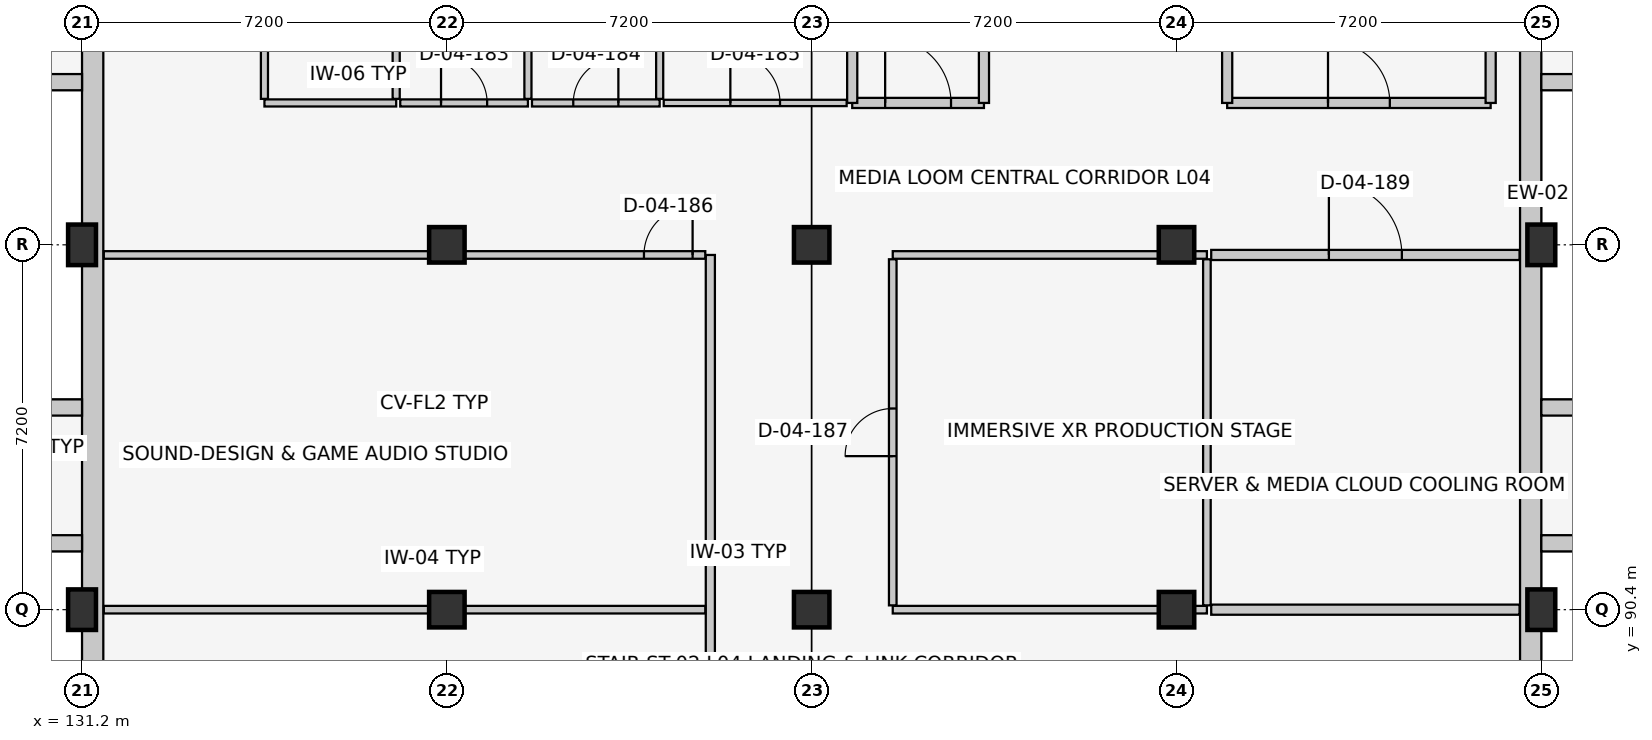
"""IFC4 building model, lengths in metres.
Left out: names, types, materials, properties, quantities, classifications, styles, units other than length and angle.
Written with IfcOpenShell. Run it as: python <this file> out.ifc"""

import sys

from ifc_helpers import new_model, si_unit, direction, frame, frame_2d, origin, origin_2d, place, context, subcontext, project, spatial, rectangle, extrude, element, fill, save


model = new_model("IFC4")
c1 = context("Model", 3, precision=1e-05, world=origin(), true_north=direction((0.0, 1.0)))
c2 = subcontext(c1, "Body", "Model", "MODEL_VIEW")
j1 = project(units=[si_unit("LENGTHUNIT", "METRE"), si_unit("PLANEANGLEUNIT", "RADIAN")], contexts=[c1])
p1 = place(None, origin())
s1 = spatial("IfcSite", under=j1, at=p1, CompositionType="ELEMENT")
p2 = place(p1, origin())
s2 = spatial("IfcBuilding", under=s1, at=p2, CompositionType="ELEMENT")
p3 = place(p2, frame((0.0, 0.0, 18.0)))
s3 = spatial("IfcBuildingStorey", under=s2, at=p3, CompositionType="ELEMENT", Elevation=18.0)
for number, where, z_axis, x_axis in (
    (1, (131.2, 90.4, 0.0), (0.0, 0.0, 1.0), (1.0, 0.0, 0.0)),
    (2, (131.2, 97.6, 0.0), (0.0, 0.0, 1.0), (1.0, 0.0, 0.0)),
):
    element("IfcColumn", number, at=place(p3, frame(where, z_axis=z_axis, x_axis=x_axis)), inside=s3, PredefinedType="COLUMN", context=c2, shape_type="SweptSolid", body=[
        extrude(rectangle(XDim=0.55, YDim=0.8, at=origin_2d()), origin(), (0.0, 0.0, 1.0), 3.9),
    ])
for number, where, z_axis, x_axis in (
    (3, (138.4, 90.4, 0.0), (0.0, 0.0, 1.0), (1.0, 0.0, 0.0)),
    (4, (138.4, 97.6, 0.0), (0.0, 0.0, 1.0), (1.0, 0.0, 0.0)),
    (5, (145.6, 90.4, 0.0), (0.0, 0.0, 1.0), (1.0, 0.0, 0.0)),
    (6, (145.6, 97.6, 0.0), (0.0, 0.0, 1.0), (1.0, 0.0, 0.0)),
    (7, (152.8, 90.4, 0.0), (0.0, 0.0, 1.0), (1.0, 0.0, 0.0)),
    (8, (152.8, 97.6, 0.0), (0.0, 0.0, 1.0), (1.0, 0.0, 0.0)),
):
    element("IfcColumn", number, at=place(p3, frame(where, z_axis=z_axis, x_axis=x_axis)), inside=s3, PredefinedType="COLUMN", context=c2, shape_type="SweptSolid", body=[
        extrude(rectangle(XDim=0.7, YDim=0.7, at=origin_2d()), origin(), (0.0, 0.0, 1.0), 3.9),
    ])
for number, where, z_axis, x_axis in (
    (9, (160.0, 90.4, 0.0), (0.0, 0.0, 1.0), (1.0, 0.0, 0.0)),
    (10, (160.0, 97.6, 0.0), (0.0, 0.0, 1.0), (1.0, 0.0, 0.0)),
):
    element("IfcColumn", number, at=place(p3, frame(where, z_axis=z_axis, x_axis=x_axis)), inside=s3, PredefinedType="COLUMN", context=c2, shape_type="SweptSolid", body=[
        extrude(rectangle(XDim=0.55, YDim=0.8, at=origin_2d()), origin(), (0.0, 0.0, 1.0), 3.9),
    ])
p4 = place(p3, frame((159.79, 112.0, 0.0), z_axis=(0.0, 0.0, 1.0), x_axis=(0.0, -1.0, 0.0)))
e11 = element("IfcWall", 11, at=p4, inside=s3, PredefinedType="SOLIDWALL", context=c2, shape_type="SweptSolid", body=[
    extrude(rectangle(XDim=28.8, YDim=0.42, at=frame_2d((14.4, 0.0))), origin(), (0.0, 0.0, 1.0), 3.055),
])
p5 = place(p3, frame((160.0, 91.71, 0.0), z_axis=(0.0, 0.0, 1.0), x_axis=(1.0, 0.0, 0.0)))
e12 = element("IfcWall", 12, at=p5, inside=s3, PredefinedType="SOLIDWALL", context=c2, shape_type="SweptSolid", body=[
    extrude(rectangle(XDim=1.35, YDim=0.32, at=frame_2d((0.675, 0.0))), origin(), (0.0, 0.0, 1.0), 3.64),
])
for number, where, z_axis, x_axis in (
    (13, (160.0, 94.39, 0.0), (0.0, 0.0, 1.0), (1.0, 0.0, 0.0)),
    (14, (160.0, 100.81, 0.0), (0.0, 0.0, 1.0), (1.0, 0.0, 0.0)),
):
    element("IfcWall", number, at=place(p3, frame(where, z_axis=z_axis, x_axis=x_axis)), inside=s3, PredefinedType="SOLIDWALL", context=c2, shape_type="SweptSolid", body=[
        extrude(rectangle(XDim=1.793, YDim=0.32, at=frame_2d((0.896, 0.0))), origin(), (0.0, 0.0, 1.0), 3.64),
    ])
p6 = place(p3, frame((131.41, 83.2, 0.0), z_axis=(0.0, 0.0, 1.0), x_axis=(0.0, 1.0, 0.0)))
e15 = element("IfcWall", 15, at=p6, inside=s3, PredefinedType="SOLIDWALL", context=c2, shape_type="SweptSolid", body=[
    extrude(rectangle(XDim=28.8, YDim=0.42, at=frame_2d((14.4, 0.0))), origin(), (0.0, 0.0, 1.0), 3.055),
])
p7 = place(p3, frame((131.2, 91.71, 0.0), z_axis=(0.0, 0.0, 1.0), x_axis=(-1.0, 0.0, 0.0)))
e16 = element("IfcWall", 16, at=p7, inside=s3, PredefinedType="SOLIDWALL", context=c2, shape_type="SweptSolid", body=[
    extrude(rectangle(XDim=1.793, YDim=0.32, at=frame_2d((0.896, 0.0))), origin(), (0.0, 0.0, 1.0), 3.64),
])
for number, where, z_axis, x_axis in (
    (17, (131.2, 94.39, 0.0), (0.0, 0.0, 1.0), (-1.0, 0.0, 0.0)),
    (18, (131.2, 100.81, 0.0), (0.0, 0.0, 1.0), (-1.0, 0.0, 0.0)),
):
    element("IfcWall", number, at=place(p3, frame(where, z_axis=z_axis, x_axis=x_axis)), inside=s3, PredefinedType="SOLIDWALL", context=c2, shape_type="SweptSolid", body=[
        extrude(rectangle(XDim=1.35, YDim=0.32, at=frame_2d((0.675, 0.0))), origin(), (0.0, 0.0, 1.0), 3.64),
    ])
p8 = place(p3, frame((146.4, 100.4, 0.0), z_axis=(0.0, 0.0, 1.0), x_axis=(1.0, 0.0, 0.0)))
e19 = element("IfcWall", 19, at=p8, inside=s3, PredefinedType="PARTITIONING", context=c2, shape_type="SweptSolid", body=[
    extrude(rectangle(XDim=2.6, YDim=0.2, at=frame_2d((1.3, 0.0))), origin(), (0.0, 0.0, 1.0), 3.66),
])
p9 = place(p8, frame((0.65, 0.0, 0.0)))
e20 = element("IfcOpeningElement", 20, at=p9, cuts=e19, PredefinedType="OPENING", context=c2, shape_type="SweptSolid", body=[
    extrude(rectangle(XDim=1.3, YDim=2.2, at=frame_2d((0.65, 1.1))), frame((0.0, 0.112, 0.0), z_axis=(0.0, -1.0, 0.0), x_axis=(1.0, 0.0, 0.0)), (0.0, 0.0, 1.0), 0.224),
])
p10 = place(p3, frame((146.4, 106.2, 0.0), z_axis=(0.0, 0.0, 1.0), x_axis=(0.0, -1.0, 0.0)))
e21 = element("IfcWall", 21, at=p10, inside=s3, PredefinedType="PARTITIONING", context=c2, shape_type="SweptSolid", body=[
    extrude(rectangle(XDim=5.8, YDim=0.2, at=frame_2d((2.9, 0.0))), origin(), (0.0, 0.0, 1.0), 3.66),
])
p11 = place(p3, frame((149.0, 100.4, 0.0), z_axis=(0.0, 0.0, 1.0), x_axis=(0.0, 1.0, 0.0)))
e22 = element("IfcWall", 22, at=p11, inside=s3, PredefinedType="PARTITIONING", context=c2, shape_type="SweptSolid", body=[
    extrude(rectangle(XDim=5.8, YDim=0.2, at=frame_2d((2.9, 0.0))), origin(), (0.0, 0.0, 1.0), 3.325),
])
p12 = place(p3, frame((153.8, 100.4, 0.0), z_axis=(0.0, 0.0, 1.0), x_axis=(1.0, 0.0, 0.0)))
e23 = element("IfcWall", 23, at=p12, inside=s3, PredefinedType="PARTITIONING", context=c2, shape_type="SweptSolid", body=[
    extrude(rectangle(XDim=5.2, YDim=0.2, at=frame_2d((2.6, 0.0))), origin(), (0.0, 0.0, 1.0), 3.66),
])
p13 = place(p12, frame((1.99, 0.0, 0.0)))
e24 = element("IfcOpeningElement", 24, at=p13, cuts=e23, PredefinedType="OPENING", context=c2, shape_type="SweptSolid", body=[
    extrude(rectangle(XDim=1.22, YDim=2.2, at=frame_2d((0.61, 1.1))), frame((0.0, 0.112, 0.0), z_axis=(0.0, -1.0, 0.0), x_axis=(1.0, 0.0, 0.0)), (0.0, 0.0, 1.0), 0.224),
])
for number, where, z_axis, x_axis in (
    (25, (153.8, 106.2, 0.0), (0.0, 0.0, 1.0), (0.0, -1.0, 0.0)),
    (26, (159.0, 100.4, 0.0), (0.0, 0.0, 1.0), (0.0, 1.0, 0.0)),
):
    element("IfcWall", number, at=place(p3, frame(where, z_axis=z_axis, x_axis=x_axis)), inside=s3, PredefinedType="PARTITIONING", context=c2, shape_type="SweptSolid", body=[
        extrude(rectangle(XDim=5.8, YDim=0.2, at=frame_2d((2.9, 0.0))), origin(), (0.0, 0.0, 1.0), 3.66),
    ])
p14 = place(p3, frame((143.6, 83.63, 0.0), z_axis=(0.0, 0.0, 1.0), x_axis=(0.0, 1.0, 0.0)))
e27 = element("IfcWall", 27, at=p14, inside=s3, PredefinedType="PARTITIONING", context=c2, shape_type="SweptSolid", body=[
    extrude(rectangle(XDim=13.77, YDim=0.18, at=frame_2d((6.885, 0.0))), origin(), (0.0, 0.0, 1.0), 3.66),
])
p15 = place(p14, frame((2.925, 0.0, 0.0)))
e28 = element("IfcOpeningElement", 28, at=p15, cuts=e27, PredefinedType="OPENING", context=c2, shape_type="SweptSolid", body=[
    extrude(rectangle(XDim=0.92, YDim=2.08, at=frame_2d((0.46, 1.04))), frame((0.0, 0.102, 0.0), z_axis=(0.0, -1.0, 0.0), x_axis=(1.0, 0.0, 0.0)), (0.0, 0.0, 1.0), 0.204),
])
p16 = place(p3, frame((134.8, 100.4, 0.0), z_axis=(0.0, 0.0, 1.0), x_axis=(1.0, 0.0, 0.0)))
e29 = element("IfcWall", 29, at=p16, inside=s3, PredefinedType="PARTITIONING", context=c2, shape_type="SweptSolid", body=[
    extrude(rectangle(XDim=2.6, YDim=0.14, at=frame_2d((1.3, 0.0))), origin(), (0.0, 0.0, 1.0), 3.66),
])
p17 = place(p3, frame((134.8, 100.48, 0.0), z_axis=(0.0, 0.0, 1.0), x_axis=(0.0, 1.0, 0.0)))
e30 = element("IfcWall", 30, at=p17, inside=s3, PredefinedType="PARTITIONING", context=c2, shape_type="SweptSolid", body=[
    extrude(rectangle(XDim=4.86, YDim=0.14, at=frame_2d((2.43, 0.0))), origin(), (0.0, 0.0, 1.0), 3.445),
])
p18 = place(p17, frame((1.93, 0.0, 0.0)))
e31 = element("IfcOpeningElement", 31, at=p18, cuts=e30, PredefinedType="OPENING", context=c2, shape_type="SweptSolid", body=[
    extrude(rectangle(XDim=1.0, YDim=2.1, at=frame_2d((0.5, 1.05))), frame((0.0, 0.082, 0.0), z_axis=(0.0, -1.0, 0.0), x_axis=(1.0, 0.0, 0.0)), (0.0, 0.0, 1.0), 0.164),
])
p19 = place(p3, frame((137.4, 100.48, 0.0), z_axis=(0.0, 0.0, 1.0), x_axis=(0.0, 1.0, 0.0)))
e32 = element("IfcWall", 32, at=p19, inside=s3, PredefinedType="PARTITIONING", context=c2, shape_type="SweptSolid", body=[
    extrude(rectangle(XDim=4.86, YDim=0.14, at=frame_2d((2.43, 0.0))), origin(), (0.0, 0.0, 1.0), 3.66),
])
p20 = place(p3, frame((137.48, 100.4, 0.0), z_axis=(0.0, 0.0, 1.0), x_axis=(1.0, 0.0, 0.0)))
e33 = element("IfcWall", 33, at=p20, inside=s3, PredefinedType="PARTITIONING", context=c2, shape_type="SweptSolid", body=[
    extrude(rectangle(XDim=2.52, YDim=0.14, at=frame_2d((1.26, 0.0))), origin(), (0.0, 0.0, 1.0), 3.66),
])
p21 = place(p20, frame((0.805, 0.0, 0.0)))
e34 = element("IfcOpeningElement", 34, at=p21, cuts=e33, PredefinedType="OPENING", context=c2, shape_type="SweptSolid", body=[
    extrude(rectangle(XDim=0.91, YDim=2.06, at=frame_2d((0.455, 1.03))), frame((0.0, 0.082, 0.0), z_axis=(0.0, -1.0, 0.0), x_axis=(1.0, 0.0, 0.0)), (0.0, 0.0, 1.0), 0.164),
])
p22 = place(p3, frame((140.0, 100.48, 0.0), z_axis=(0.0, 0.0, 1.0), x_axis=(0.0, 1.0, 0.0)))
e35 = element("IfcWall", 35, at=p22, inside=s3, PredefinedType="PARTITIONING", context=c2, shape_type="SweptSolid", body=[
    extrude(rectangle(XDim=4.86, YDim=0.14, at=frame_2d((2.43, 0.0))), origin(), (0.0, 0.0, 1.0), 3.66),
])
p23 = place(p3, frame((140.08, 100.4, 0.0), z_axis=(0.0, 0.0, 1.0), x_axis=(1.0, 0.0, 0.0)))
e36 = element("IfcWall", 36, at=p23, inside=s3, PredefinedType="PARTITIONING", context=c2, shape_type="SweptSolid", body=[
    extrude(rectangle(XDim=2.52, YDim=0.14, at=frame_2d((1.26, 0.0))), origin(), (0.0, 0.0, 1.0), 3.66),
])
p24 = place(p23, frame((0.815, 0.0, 0.0)))
e37 = element("IfcOpeningElement", 37, at=p24, cuts=e36, PredefinedType="OPENING", context=c2, shape_type="SweptSolid", body=[
    extrude(rectangle(XDim=0.89, YDim=2.05, at=frame_2d((0.445, 1.025))), frame((0.0, 0.082, 0.0), z_axis=(0.0, -1.0, 0.0), x_axis=(1.0, 0.0, 0.0)), (0.0, 0.0, 1.0), 0.164),
])
p25 = place(p3, frame((142.6, 100.48, 0.0), z_axis=(0.0, 0.0, 1.0), x_axis=(0.0, 1.0, 0.0)))
e38 = element("IfcWall", 38, at=p25, inside=s3, PredefinedType="PARTITIONING", context=c2, shape_type="SweptSolid", body=[
    extrude(rectangle(XDim=4.86, YDim=0.14, at=frame_2d((2.43, 0.0))), origin(), (0.0, 0.0, 1.0), 3.66),
])
p26 = place(p3, frame((142.68, 100.4, 0.0), z_axis=(0.0, 0.0, 1.0), x_axis=(1.0, 0.0, 0.0)))
e39 = element("IfcWall", 39, at=p26, inside=s3, PredefinedType="PARTITIONING", context=c2, shape_type="SweptSolid", body=[
    extrude(rectangle(XDim=3.61, YDim=0.125, at=frame_2d((1.805, 0.0))), origin(), (0.0, 0.0, 1.0), 3.66),
])
p27 = place(p26, frame((1.315, 0.0, 0.0)))
e40 = element("IfcOpeningElement", 40, at=p27, cuts=e39, PredefinedType="OPENING", context=c2, shape_type="SweptSolid", body=[
    extrude(rectangle(XDim=0.98, YDim=2.12, at=frame_2d((0.49, 1.06))), frame((0.0, 0.074, 0.0), z_axis=(0.0, -1.0, 0.0), x_axis=(1.0, 0.0, 0.0)), (0.0, 0.0, 1.0), 0.149),
])
p28 = place(p3, frame((131.63, 90.4, 0.0), z_axis=(0.0, 0.0, 1.0), x_axis=(1.0, 0.0, 0.0)))
e41 = element("IfcWall", 41, at=p28, inside=s3, PredefinedType="PARTITIONING", context=c2, shape_type="SweptSolid", body=[
    extrude(rectangle(XDim=11.87, YDim=0.15, at=frame_2d((5.935, 0.0))), origin(), (0.0, 0.0, 1.0), 2.835),
])
p29 = place(p3, frame((131.63, 97.4, 0.0), z_axis=(0.0, 0.0, 1.0), x_axis=(1.0, 0.0, 0.0)))
e42 = element("IfcWall", 42, at=p29, inside=s3, PredefinedType="PARTITIONING", context=c2, shape_type="SweptSolid", body=[
    extrude(rectangle(XDim=11.87, YDim=0.15, at=frame_2d((5.935, 0.0))), origin(), (0.0, 0.0, 1.0), 2.835),
])
p30 = place(p29, frame((10.66, 0.0, 0.0)))
e43 = element("IfcOpeningElement", 43, at=p30, cuts=e42, PredefinedType="OPENING", context=c2, shape_type="SweptSolid", body=[
    extrude(rectangle(XDim=0.96, YDim=2.1, at=frame_2d((0.48, 1.05))), frame((0.0, 0.087, 0.0), z_axis=(0.0, -1.0, 0.0), x_axis=(1.0, 0.0, 0.0)), (0.0, 0.0, 1.0), 0.174),
])
for number, where, z_axis, x_axis in (
    (44, (147.2, 90.4, 0.0), (0.0, 0.0, 1.0), (1.0, 0.0, 0.0)),
    (45, (147.2, 97.4, 0.0), (0.0, 0.0, 1.0), (1.0, 0.0, 0.0)),
):
    element("IfcWall", number, at=place(p3, frame(where, z_axis=z_axis, x_axis=x_axis)), inside=s3, PredefinedType="PARTITIONING", context=c2, shape_type="SweptSolid", body=[
        extrude(rectangle(XDim=6.2, YDim=0.15, at=frame_2d((3.1, 0.0))), origin(), (0.0, 0.0, 1.0), 2.985),
    ])
p31 = place(p3, frame((147.2, 90.485, 0.0), z_axis=(0.0, 0.0, 1.0), x_axis=(0.0, 1.0, 0.0)))
e46 = element("IfcWall", 46, at=p31, inside=s3, PredefinedType="PARTITIONING", context=c2, shape_type="SweptSolid", body=[
    extrude(rectangle(XDim=6.83, YDim=0.15, at=frame_2d((3.415, 0.0))), origin(), (0.0, 0.0, 1.0), 3.66),
])
p32 = place(p31, frame((2.945, 0.0, 0.0)))
e47 = element("IfcOpeningElement", 47, at=p32, cuts=e46, PredefinedType="OPENING", context=c2, shape_type="SweptSolid", body=[
    extrude(rectangle(XDim=0.94, YDim=2.1, at=frame_2d((0.47, 1.05))), frame((0.0, 0.087, 0.0), z_axis=(0.0, -1.0, 0.0), x_axis=(1.0, 0.0, 0.0)), (0.0, 0.0, 1.0), 0.174),
])
p33 = place(p3, frame((153.4, 90.485, 0.0), z_axis=(0.0, 0.0, 1.0), x_axis=(0.0, 1.0, 0.0)))
e48 = element("IfcWall", 48, at=p33, inside=s3, PredefinedType="PARTITIONING", context=c2, shape_type="SweptSolid", body=[
    extrude(rectangle(XDim=6.83, YDim=0.15, at=frame_2d((3.415, 0.0))), origin(), (0.0, 0.0, 1.0), 3.66),
])
p34 = place(p3, frame((153.485, 90.4, 0.0), z_axis=(0.0, 0.0, 1.0), x_axis=(1.0, 0.0, 0.0)))
e49 = element("IfcWall", 49, at=p34, inside=s3, PredefinedType="PARTITIONING", context=c2, shape_type="SweptSolid", body=[
    extrude(rectangle(XDim=6.085, YDim=0.2, at=frame_2d((3.042, 0.0))), origin(), (0.0, 0.0, 1.0), 2.985),
])
p35 = place(p3, frame((153.485, 97.4, 0.0), z_axis=(0.0, 0.0, 1.0), x_axis=(1.0, 0.0, 0.0)))
e50 = element("IfcWall", 50, at=p35, inside=s3, PredefinedType="PARTITIONING", context=c2, shape_type="SweptSolid", body=[
    extrude(rectangle(XDim=6.085, YDim=0.2, at=frame_2d((3.042, 0.0))), origin(), (0.0, 0.0, 1.0), 2.985),
])
p36 = place(p35, frame((2.323, 0.0, 0.0)))
e51 = element("IfcOpeningElement", 51, at=p36, cuts=e50, PredefinedType="OPENING", context=c2, shape_type="SweptSolid", body=[
    extrude(rectangle(XDim=1.44, YDim=2.2, at=frame_2d((0.72, 1.1))), frame((0.0, 0.112, 0.0), z_axis=(0.0, -1.0, 0.0), x_axis=(1.0, 0.0, 0.0)), (0.0, 0.0, 1.0), 0.224),
])
p37 = place(p9, origin())
e52 = element("IfcDoor", 52, at=p37, inside=s3, OperationType="SINGLE_SWING_LEFT", PredefinedType="DOOR", context=c2, shape_type="SweptSolid", body=[
    extrude(rectangle(XDim=1.3, YDim=2.2, at=frame_2d((0.65, 1.1))), frame((0.0, 0.025, 0.0), z_axis=(0.0, -1.0, 0.0), x_axis=(1.0, 0.0, 0.0)), (0.0, 0.0, 1.0), 0.05),
])
fill(e20, e52)
p38 = place(p13, origin())
e53 = element("IfcDoor", 53, at=p38, inside=s3, OperationType="SINGLE_SWING_LEFT", PredefinedType="DOOR", context=c2, shape_type="SweptSolid", body=[
    extrude(rectangle(XDim=1.22, YDim=2.2, at=frame_2d((0.61, 1.1))), frame((0.0, 0.025, 0.0), z_axis=(0.0, -1.0, 0.0), x_axis=(1.0, 0.0, 0.0)), (0.0, 0.0, 1.0), 0.05),
])
fill(e24, e53)
p39 = place(p21, origin())
e54 = element("IfcDoor", 54, at=p39, inside=s3, OperationType="SINGLE_SWING_LEFT", PredefinedType="DOOR", context=c2, shape_type="SweptSolid", body=[
    extrude(rectangle(XDim=0.91, YDim=2.06, at=frame_2d((0.455, 1.03))), frame((0.0, 0.025, 0.0), z_axis=(0.0, -1.0, 0.0), x_axis=(1.0, 0.0, 0.0)), (0.0, 0.0, 1.0), 0.05),
])
fill(e34, e54)
p40 = place(p24, origin())
e55 = element("IfcDoor", 55, at=p40, inside=s3, OperationType="SINGLE_SWING_RIGHT", PredefinedType="DOOR", context=c2, shape_type="SweptSolid", body=[
    extrude(rectangle(XDim=0.89, YDim=2.05, at=frame_2d((0.445, 1.025))), frame((0.0, 0.025, 0.0), z_axis=(0.0, -1.0, 0.0), x_axis=(1.0, 0.0, 0.0)), (0.0, 0.0, 1.0), 0.05),
])
fill(e37, e55)
p41 = place(p27, origin())
e56 = element("IfcDoor", 56, at=p41, inside=s3, OperationType="SINGLE_SWING_LEFT", PredefinedType="DOOR", context=c2, shape_type="SweptSolid", body=[
    extrude(rectangle(XDim=0.98, YDim=2.12, at=frame_2d((0.49, 1.06))), frame((0.0, 0.025, 0.0), z_axis=(0.0, -1.0, 0.0), x_axis=(1.0, 0.0, 0.0)), (0.0, 0.0, 1.0), 0.05),
])
fill(e40, e56)
p42 = place(p30, origin())
e57 = element("IfcDoor", 57, at=p42, inside=s3, OperationType="SINGLE_SWING_RIGHT", PredefinedType="DOOR", context=c2, shape_type="SweptSolid", body=[
    extrude(rectangle(XDim=0.96, YDim=2.1, at=frame_2d((0.48, 1.05))), frame((0.0, 0.025, 0.0), z_axis=(0.0, -1.0, 0.0), x_axis=(1.0, 0.0, 0.0)), (0.0, 0.0, 1.0), 0.05),
])
fill(e43, e57)
p43 = place(p32, origin())
e58 = element("IfcDoor", 58, at=p43, inside=s3, OperationType="SINGLE_SWING_LEFT", PredefinedType="DOOR", context=c2, shape_type="SweptSolid", body=[
    extrude(rectangle(XDim=0.94, YDim=2.1, at=frame_2d((0.47, 1.05))), frame((0.0, 0.025, 0.0), z_axis=(0.0, -1.0, 0.0), x_axis=(1.0, 0.0, 0.0)), (0.0, 0.0, 1.0), 0.05),
])
fill(e47, e58)
p44 = place(p36, origin())
e59 = element("IfcDoor", 59, at=p44, inside=s3, OperationType="SINGLE_SWING_LEFT", PredefinedType="DOOR", context=c2, shape_type="SweptSolid", body=[
    extrude(rectangle(XDim=1.44, YDim=2.2, at=frame_2d((0.72, 1.1))), frame((0.0, 0.025, 0.0), z_axis=(0.0, -1.0, 0.0), x_axis=(1.0, 0.0, 0.0)), (0.0, 0.0, 1.0), 0.05),
])
fill(e51, e59)
save(model, sys.argv[1])
